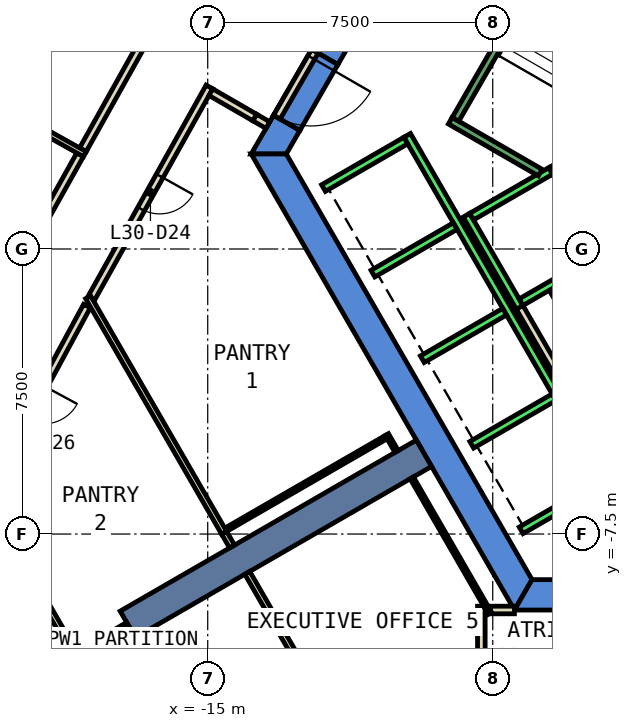
"""IFC4 building model, lengths in metres.
Left out: names, types, materials, properties, quantities, classifications, styles, units other than length and angle.
Written with IfcOpenShell. Run it as: python <this file> out.ifc"""

import sys

from ifc_helpers import new_model, si_unit, direction, frame, frame_2d, origin, place, context, subcontext, project, spatial, polyline, rectangle, outline, extrude, element, fill, save


model = new_model("IFC4")
c1 = context("Model", 3, precision=1e-05, world=origin(), true_north=direction((0.0, 1.0)))
c2 = subcontext(c1, "Body", "Model", "MODEL_VIEW")
j1 = project(units=[si_unit("LENGTHUNIT", "METRE"), si_unit("PLANEANGLEUNIT", "RADIAN")], contexts=[c1])
p1 = place(None, origin())
s1 = spatial("IfcSite", under=j1, at=p1, CompositionType="ELEMENT")
p2 = place(p1, origin())
s2 = spatial("IfcBuilding", under=s1, at=p2, CompositionType="ELEMENT")
p3 = place(p2, frame((0.0, 0.0, 138.2)))
s3 = spatial("IfcBuildingStorey", under=s2, at=p3, CompositionType="ELEMENT", Elevation=138.2)
p4 = place(p3, frame((0.0, 0.0, -0.6)))
e1 = element("IfcWall", 1, at=p4, inside=s3, PredefinedType="SHEAR", context=c2, shape_type="SweptSolid", body=[
    extrude(outline(polyline([(-12.267, 5.252), (-11.575, 4.852), (-6.466, 13.7), (-6.928, 14.5), (-12.267, 5.252)])), origin(), (0.0, 0.0, 1.0), 4.4),
])
p5 = place(p3, frame((0.0, 0.0, -0.6)))
e2 = element("IfcWall", 2, at=p5, inside=s3, PredefinedType="SHEAR", context=c2, shape_type="SweptSolid", body=[
    extrude(outline(polyline([(-12.575, 3.12), (-13.267, 3.52), (-13.856, 2.5), (-12.933, 2.5), (-12.575, 3.12)])), origin(), (0.0, 0.0, 1.0), 4.4),
])
p6 = place(p3, frame((0.0, 0.0, 3.6)))
e3 = element("IfcWall", 3, at=p6, inside=s3, PredefinedType="SHEAR", context=c2, shape_type="SweptSolid", body=[
    extrude(outline(polyline([(-13.267, 3.52), (-12.575, 3.12), (-11.575, 4.852), (-12.267, 5.252), (-13.267, 3.52)])), origin(), (0.0, 0.0, 1.0), 0.2),
])
p7 = place(p3, frame((0.0, 0.0, -0.6)))
e4 = element("IfcWall", 4, at=p7, inside=s3, PredefinedType="SHEAR", context=c2, shape_type="SweptSolid", body=[
    extrude(outline(polyline([(-13.856, 2.5), (-6.928, -9.5), (-6.466, -8.7), (-12.933, 2.5), (-13.856, 2.5)])), origin(), (0.0, 0.0, 1.0), 4.4),
])
p8 = place(p3, frame((0.0, 0.0, -0.6)))
e5 = element("IfcWall", 5, at=p8, inside=s3, PredefinedType="SHEAR", context=c2, shape_type="SweptSolid", body=[
    extrude(outline(polyline([(3.75, -9.5), (3.75, -8.7), (-6.466, -8.7), (-6.928, -9.5), (3.75, -9.5)])), origin(), (0.0, 0.0, 1.0), 4.4),
])
p9 = place(p3, frame((-9.31, -5.375, -0.6), z_axis=(0.0, 0.0, 1.0), x_axis=(-0.866017533419, -0.500013631625, 0.0)))
e6 = element("IfcWall", 6, at=p9, inside=s3, PredefinedType="SHEAR", context=c2, shape_type="SweptSolid", body=[
    extrude(rectangle(XDim=9.0, YDim=0.8, at=frame_2d((4.5, 0.0))), origin(), (0.0, 0.0, 1.0), 4.4),
])
p10 = place(p3, frame((-13.417, 3.26, 0.0), z_axis=(0.0, 0.0, 1.0), x_axis=(-0.866398669086, 0.499352927503, 0.0)))
e7 = element("IfcWall", 7, at=p10, inside=s3, PredefinedType="PARTITIONING", context=c2, shape_type="SweptSolid", body=[
    extrude(rectangle(XDim=0.4, YDim=0.2, at=frame_2d((0.2, 0.0))), origin(), (0.0, 0.0, 1.0), 2.4),
])
p11 = place(p3, frame((-14.955, 4.264, 0.0), z_axis=(0.0, 0.0, 1.0), x_axis=(-0.4879770011, -0.872856486713, 0.0)))
e8 = element("IfcWall", 8, at=p11, inside=s3, PredefinedType="PARTITIONING", context=c2, shape_type="SweptSolid", body=[
    extrude(rectangle(XDim=6.363, YDim=0.2, at=frame_2d((3.182, 0.0))), origin(), (0.0, 0.0, 1.0), 3.8),
])
p12 = place(p11, frame((2.681, 0.0, 0.0)))
e9 = element("IfcOpeningElement", 9, at=p12, cuts=e8, PredefinedType="OPENING", context=c2, shape_type="SweptSolid", body=[
    extrude(rectangle(XDim=1.0, YDim=2.1, at=frame_2d((0.5, 1.05))), frame((0.0, 0.11, 0.0), z_axis=(0.0, -1.0, 0.0), x_axis=(1.0, 0.0, 0.0)), (0.0, 0.0, 1.0), 0.22),
])
p13 = place(p3, frame((-18.178, -1.501, 0.0), z_axis=(0.0, 0.0, 1.0), x_axis=(-0.475923642768, -0.879486603795, 0.0)))
e10 = element("IfcWall", 10, at=p13, inside=s3, PredefinedType="PARTITIONING", context=c2, shape_type="SweptSolid", body=[
    extrude(rectangle(XDim=5.776, YDim=0.2, at=frame_2d((2.888, 0.0))), origin(), (0.0, 0.0, 1.0), 3.8),
])
p14 = place(p13, frame((2.388, 0.0, 0.0)))
e11 = element("IfcOpeningElement", 11, at=p14, cuts=e10, PredefinedType="OPENING", context=c2, shape_type="SweptSolid", body=[
    extrude(rectangle(XDim=1.0, YDim=2.1, at=frame_2d((0.5, 1.05))), frame((0.0, 0.11, 0.0), z_axis=(0.0, -1.0, 0.0), x_axis=(1.0, 0.0, 0.0)), (0.0, 0.0, 1.0), 0.22),
])
p15 = place(p3, frame((-18.284, 2.612, 0.0), z_axis=(0.0, 0.0, 1.0), x_axis=(0.487871212611, 0.872915620152, 0.0)))
e12 = element("IfcWall", 12, at=p15, inside=s3, PredefinedType="PARTITIONING", context=c2, shape_type="SweptSolid", body=[
    extrude(rectangle(XDim=3.402, YDim=0.2, at=frame_2d((1.701, 0.0))), origin(), (0.0, 0.0, 1.0), 3.8),
])
p16 = place(p3, frame((-20.018, -0.489, 0.0), z_axis=(0.0, 0.0, 1.0), x_axis=(0.48792588674, 0.872885060617, 0.0)))
e13 = element("IfcWall", 13, at=p16, inside=s3, PredefinedType="PARTITIONING", context=c2, shape_type="SweptSolid", body=[
    extrude(rectangle(XDim=3.403, YDim=0.2, at=frame_2d((1.701, 0.0))), origin(), (0.0, 0.0, 1.0), 3.8),
])
p17 = place(p3, frame((-5.126, -2.422, 0.0), z_axis=(0.0, 0.0, 1.0), x_axis=(-0.500062241894, 0.865989465428, 0.0)))
e14 = element("IfcWall", 14, at=p17, inside=s3, PredefinedType="PARTITIONING", context=c2, shape_type="SweptSolid", body=[
    extrude(rectangle(XDim=1.7, YDim=0.2, at=frame_2d((0.85, 0.0))), origin(), (0.0, 0.0, 1.0), 3.8),
])
p18 = place(p3, frame((-5.492, -3.788, 0.0), z_axis=(0.0, 0.0, 1.0), x_axis=(-0.500008949224, 0.866020236886, 0.0)))
e15 = element("IfcWall", 15, at=p18, inside=s3, PredefinedType="PARTITIONING", context=c2, shape_type="SweptSolid", body=[
    extrude(rectangle(XDim=2.68, YDim=0.2, at=frame_2d((1.34, 0.0))), origin(), (0.0, 0.0, 1.0), 3.8),
])
p19 = place(p3, frame((-7.572, -9.499, 0.0), z_axis=(0.0, 0.0, 1.0), x_axis=(1.0, 0.0, 0.0)))
e16 = element("IfcWall", 16, at=p19, inside=s3, PredefinedType="PARTITIONING", context=c2, shape_type="SweptSolid", body=[
    extrude(rectangle(XDim=0.643, YDim=0.2, at=frame_2d((0.322, 0.0))), origin(), (0.0, 0.0, 1.0), 3.8),
])
p20 = place(p3, frame((-7.8, -15.139, 0.0), z_axis=(0.0, 0.0, 1.0), x_axis=(0.0, 1.0, 0.0)))
e17 = element("IfcWall", 17, at=p20, inside=s3, PredefinedType="PARTITIONING", context=c2, shape_type="SweptSolid", body=[
    extrude(rectangle(XDim=5.74, YDim=0.2, at=frame_2d((2.87, 0.0))), origin(), (0.0, 0.0, 1.0), 3.8),
])
p21 = place(p20, frame((2.37, 0.0, 0.0)))
e18 = element("IfcOpeningElement", 18, at=p21, cuts=e17, PredefinedType="OPENING", context=c2, shape_type="SweptSolid", body=[
    extrude(rectangle(XDim=1.0, YDim=2.1, at=frame_2d((0.5, 1.05))), frame((0.0, 0.11, 0.0), z_axis=(0.0, -1.0, 0.0), x_axis=(1.0, 0.0, 0.0)), (0.0, 0.0, 1.0), 0.22),
])
p22 = place(p3, frame((-7.572, -9.586, 0.0), z_axis=(0.0, 0.0, 1.0), x_axis=(-0.500037407586, 0.866003805427, 0.0)))
e19 = element("IfcWall", 19, at=p22, inside=s3, PredefinedType="PARTITIONING", context=c2, shape_type="SweptSolid", body=[
    extrude(rectangle(XDim=4.115, YDim=0.1, at=frame_2d((2.058, 0.0))), origin(), (0.0, 0.0, 1.0), 3.8),
])
p23 = place(p3, frame((-10.305, -4.951, 0.0), z_axis=(0.0, 0.0, 1.0), x_axis=(-0.866031185235, -0.4999899861, 0.0)))
e20 = element("IfcWall", 20, at=p23, inside=s3, PredefinedType="PARTITIONING", context=c2, shape_type="SweptSolid", body=[
    extrude(rectangle(XDim=4.95, YDim=0.1, at=frame_2d((2.475, 0.0))), origin(), (0.0, 0.0, 1.0), 3.8),
])
p24 = place(p3, frame((-14.567, -7.469, 0.0), z_axis=(0.0, 0.0, 1.0), x_axis=(-0.500056007527, 0.865993065409, 0.0)))
e21 = element("IfcWall", 21, at=p24, inside=s3, PredefinedType="PARTITIONING", context=c2, shape_type="SweptSolid", body=[
    extrude(rectangle(XDim=7.159, YDim=0.15, at=frame_2d((3.58, 0.0))), origin(), (0.0, 0.0, 1.0), 3.8),
])
p25 = place(p3, frame((-14.359, -7.828, 0.0), z_axis=(0.0, 0.0, 1.0), x_axis=(-0.501453821755, 0.865184410775, 0.0)))
e22 = element("IfcWall", 22, at=p25, inside=s3, PredefinedType="PARTITIONING", context=c2, shape_type="SweptSolid", body=[
    extrude(rectangle(XDim=0.415, YDim=0.15, at=frame_2d((0.208, 0.0))), origin(), (0.0, 0.0, 1.0), 3.8),
])
p26 = place(p3, frame((-10.18, -15.068, 0.0), z_axis=(0.0, 0.0, 1.0), x_axis=(-0.499907901386, 0.866078570415, 0.0)))
e23 = element("IfcWall", 23, at=p26, inside=s3, PredefinedType="PARTITIONING", context=c2, shape_type="SweptSolid", body=[
    extrude(rectangle(XDim=7.56, YDim=0.15, at=frame_2d((3.78, 0.0))), origin(), (0.0, 0.0, 1.0), 3.8),
])
p27 = place(p3, frame((-17.108, -9.869, 0.0), z_axis=(0.0, 0.0, 1.0), x_axis=(-0.866054481515, -0.499949632511, 0.0)))
e24 = element("IfcWall", 24, at=p27, inside=s3, PredefinedType="PARTITIONING", context=c2, shape_type="SweptSolid", body=[
    extrude(rectangle(XDim=1.675, YDim=0.1, at=frame_2d((0.837, 0.0))), origin(), (0.0, 0.0, 1.0), 3.8),
])
p28 = place(p3, frame((-18.518, -10.625, 0.0), z_axis=(0.0, 0.0, 1.0), x_axis=(-0.50001189137, 0.86601853819, 0.0)))
e25 = element("IfcWall", 25, at=p28, inside=s3, PredefinedType="PARTITIONING", context=c2, shape_type="SweptSolid", body=[
    extrude(rectangle(XDim=4.746, YDim=0.15, at=frame_2d((2.373, 0.0))), origin(), (0.0, 0.0, 1.0), 3.8),
])
p29 = place(p3, frame((-18.234, 2.497, 0.0), z_axis=(0.0, 0.0, 1.0), x_axis=(-0.872820235044, 0.4880418397, 0.0)))
e26 = element("IfcWall", 26, at=p29, inside=s3, PredefinedType="PARTITIONING", context=c2, shape_type="SweptSolid", body=[
    extrude(rectangle(XDim=6.7, YDim=0.15, at=frame_2d((3.35, 0.0))), origin(), (0.0, 0.0, 1.0), 3.8),
])
p30 = place(p3, frame((-12.18, 5.202, 0.0), z_axis=(0.0, 0.0, 1.0), x_axis=(-0.50002537861, -0.866010750942, 0.0)))
e27 = element("IfcWall", 27, at=p30, inside=s3, PredefinedType="PARTITIONING", context=c2, shape_type="SweptSolid", body=[
    extrude(rectangle(XDim=2.0, YDim=0.2, at=frame_2d((1.0, 0.0))), origin(), (0.0, 0.0, 1.0), 2.4),
])
p31 = place(p30, frame((0.19, 0.0, 0.0)))
e28 = element("IfcOpeningElement", 28, at=p31, cuts=e27, PredefinedType="OPENING", context=c2, shape_type="SweptSolid", body=[
    extrude(rectangle(XDim=1.8, YDim=2.1, at=frame_2d((0.9, 1.05))), frame((0.0, 0.11, 0.0), z_axis=(0.0, -1.0, 0.0), x_axis=(1.0, 0.0, 0.0)), (0.0, 0.0, 1.0), 0.22),
])
p32 = place(p3, frame((-10.03, -5.329, 0.0), z_axis=(0.0, 0.0, 1.0), x_axis=(-0.499352927503, 0.866398669086, 0.0)))
e29 = element("IfcWall", 29, at=p32, inside=s3, PredefinedType="PARTITIONING", context=c2, shape_type="SweptSolid", body=[
    extrude(rectangle(XDim=0.515, YDim=0.1, at=frame_2d((0.257, 0.0))), origin(), (0.0, 0.0, 1.0), 3.8),
])
p33 = place(p3, frame((-13.764, 3.46, 0.0), z_axis=(0.0, 0.0, 1.0), x_axis=(-0.865932130826, 0.500161518715, 0.0)))
e30 = element("IfcWall", 30, at=p33, inside=s3, PredefinedType="PARTITIONING", context=c2, shape_type="SweptSolid", body=[
    extrude(rectangle(XDim=1.332, YDim=0.2, at=frame_2d((0.666, 0.0))), origin(), (0.0, 0.0, 1.0), 3.8),
])
p34 = place(p3, frame((-5.94, 2.188, 0.0), z_axis=(0.0, 0.0, 1.0), x_axis=(0.49994636267, -0.866056369097, 0.0)))
e31 = element("IfcWall", 31, at=p34, inside=s3, PredefinedType="STANDARD", context=c2, shape_type="SweptSolid", body=[
    extrude(rectangle(XDim=2.8, YDim=0.2, at=frame_2d((1.4, 0.0))), origin(), (0.0, 0.0, 1.0), 3.8),
])
p35 = place(p34, frame((1.225, 0.0, 0.0)))
e32 = element("IfcOpeningElement", 32, at=p35, cuts=e31, PredefinedType="OPENING", context=c2, shape_type="SweptSolid", body=[
    extrude(rectangle(XDim=1.1, YDim=2.1, at=frame_2d((0.55, 1.05))), frame((0.0, 0.11, 0.0), z_axis=(0.0, -1.0, 0.0), x_axis=(1.0, 0.0, 0.0)), (0.0, 0.0, 1.0), 0.22),
])
p36 = place(p3, frame((-8.192, 0.888, 0.0), z_axis=(0.0, 0.0, 1.0), x_axis=(0.49994636267, -0.866056369097, 0.0)))
e33 = element("IfcWall", 33, at=p36, inside=s3, PredefinedType="STANDARD", context=c2, shape_type="SweptSolid", body=[
    extrude(rectangle(XDim=2.8, YDim=0.2, at=frame_2d((1.4, 0.0))), origin(), (0.0, 0.0, 1.0), 3.8),
])
for number, where, z_axis, x_axis in (
    (34, (-5.977, 2.052, 0.0), (0.0, 0.0, 1.0), (-0.866, -0.5, 0.0)),
    (35, (-4.677, -0.2, 0.0), (0.0, 0.0, 1.0), (-0.866, -0.5, 0.0)),
):
    element("IfcWall", number, at=place(p3, frame(where, z_axis=z_axis, x_axis=x_axis)), inside=s3, PredefinedType="STANDARD", context=c2, shape_type="SweptSolid", body=[
        extrude(rectangle(XDim=2.399, YDim=0.2, at=frame_2d((1.2, 0.0))), origin(), (0.0, 0.0, 1.0), 3.8),
    ])
p37 = place(p3, frame((-9.751, 2.99, 0.0), z_axis=(0.0, 0.0, 1.0), x_axis=(0.50000090737, -0.866024879913, 0.0)))
e36 = element("IfcWall", 36, at=p37, inside=s3, PredefinedType="STANDARD", context=c2, shape_type="SweptSolid", body=[
    extrude(rectangle(XDim=10.6, YDim=0.2, at=frame_2d((5.3, 0.0))), origin(), (0.0, 0.0, 1.0), 3.8),
])
p38 = place(p3, frame((-9.788, 2.853, 0.0), z_axis=(0.0, 0.0, 1.0), x_axis=(-0.865998541277, -0.500046524342, 0.0)))
e37 = element("IfcWall", 37, at=p38, inside=s3, PredefinedType="STANDARD", context=c2, shape_type="SweptSolid", body=[
    extrude(rectangle(XDim=2.5, YDim=0.2, at=frame_2d((1.25, 0.0))), origin(), (0.0, 0.0, 1.0), 3.8),
])
for number, where, z_axis, x_axis in (
    (38, (-8.488, 0.602, 0.0), (0.0, 0.0, 1.0), (-0.866, -0.5, 0.0)),
    (39, (-7.188, -1.65, 0.0), (0.0, 0.0, 1.0), (-0.866, -0.5, 0.0)),
    (40, (-5.888, -3.902, 0.0), (0.0, 0.0, 1.0), (-0.866, -0.5, 0.0)),
    (41, (-4.588, -6.153, 0.0), (0.0, 0.0, 1.0), (-0.866, -0.5, 0.0)),
):
    element("IfcWall", number, at=place(p3, frame(where, z_axis=z_axis, x_axis=x_axis)), inside=s3, PredefinedType="STANDARD", context=c2, shape_type="SweptSolid", body=[
        extrude(rectangle(XDim=2.5, YDim=0.2, at=frame_2d((1.25, 0.0))), origin(), (0.0, 0.0, 1.0), 3.8),
    ])
p39 = place(p3, frame((-6.25, 2.01, 0.0), z_axis=(0.0, 0.0, 1.0), x_axis=(-0.86611865017, 0.499838457731, 0.0)))
e42 = element("IfcWall", 42, at=p39, inside=s3, PredefinedType="STANDARD", context=c2, shape_type="SweptSolid", body=[
    extrude(rectangle(XDim=2.733, YDim=0.2, at=frame_2d((1.366, 0.0))), origin(), (0.0, 0.0, 1.0), 3.8),
])
p40 = place(p3, frame((-5.03, 9.388, 0.0), z_axis=(0.0, 0.0, 1.0), x_axis=(-0.499978703459, -0.866037698999, 0.0)))
e43 = element("IfcWall", 43, at=p40, inside=s3, PredefinedType="STANDARD", context=c2, shape_type="SweptSolid", body=[
    extrude(rectangle(XDim=6.9, YDim=0.2, at=frame_2d((3.45, 0.0))), origin(), (0.0, 0.0, 1.0), 3.8),
])
p41 = place(p12, origin())
e44 = element("IfcDoor", 44, at=p41, inside=s3, OperationType="SINGLE_SWING_LEFT", PredefinedType="DOOR", context=c2, shape_type="SweptSolid", body=[
    extrude(rectangle(XDim=1.0, YDim=2.1, at=frame_2d((0.5, 1.05))), frame((0.0, 0.025, 0.0), z_axis=(0.0, -1.0, 0.0), x_axis=(1.0, 0.0, 0.0)), (0.0, 0.0, 1.0), 0.05),
])
fill(e9, e44)
p42 = place(p31, origin())
e45 = element("IfcDoor", 45, at=p42, inside=s3, OperationType="DOUBLE_DOOR_SINGLE_SWING", PredefinedType="DOOR", context=c2, shape_type="SweptSolid", body=[
    extrude(rectangle(XDim=1.8, YDim=2.1, at=frame_2d((0.9, 1.05))), frame((0.0, 0.025, 0.0), z_axis=(0.0, -1.0, 0.0), x_axis=(1.0, 0.0, 0.0)), (0.0, 0.0, 1.0), 0.05),
])
fill(e28, e45)
save(model, sys.argv[1])
